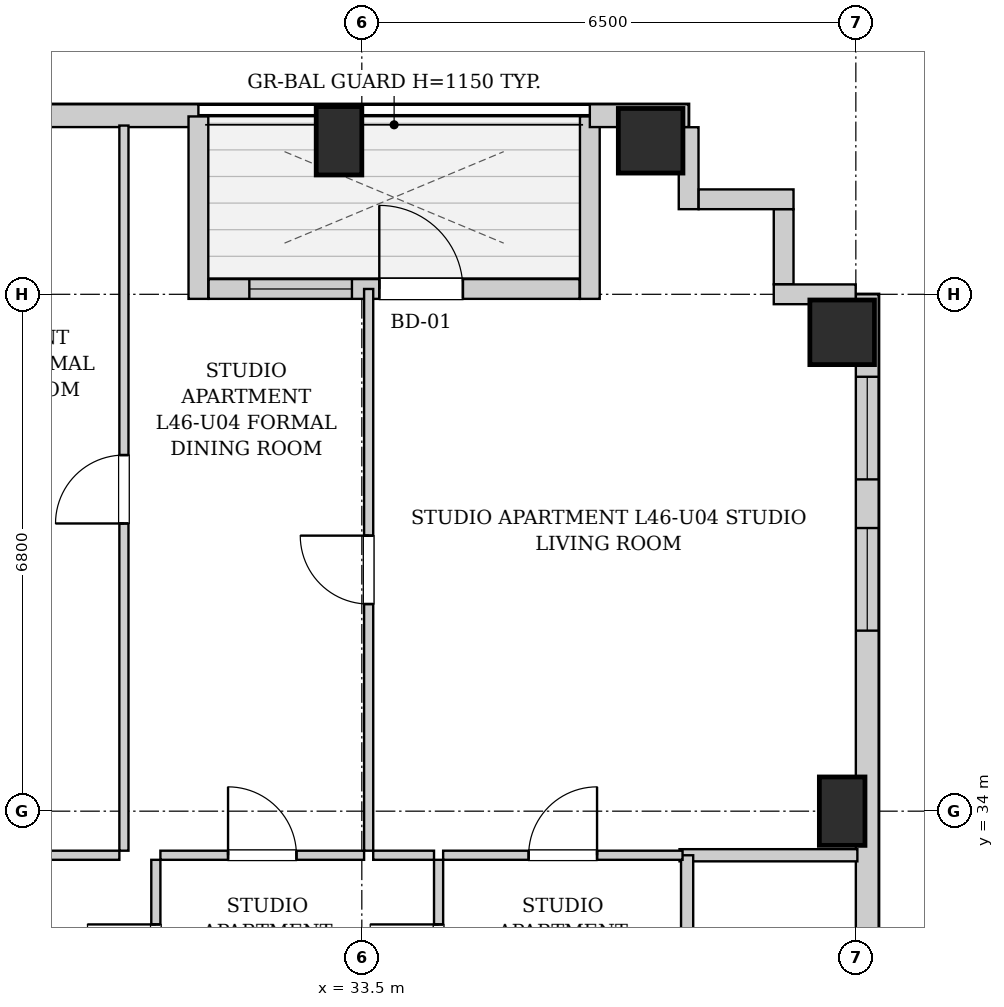
"""IFC4 building model, lengths in metres.
Left out: names, types, materials, properties, quantities, classifications, styles, units other than length and angle.
Written with IfcOpenShell. Run it as: python <this file> out.ifc"""

import sys

from ifc_helpers import new_model, si_unit, direction, frame, frame_2d, origin, origin_2d, place, context, subcontext, project, spatial, rectangle, extrude, element, fill, save


model = new_model("IFC4")
c1 = context("Model", 3, precision=1e-05, world=origin(), true_north=direction((0.0, 1.0)))
c2 = subcontext(c1, "Body", "Model", "MODEL_VIEW")
j1 = project(units=[si_unit("LENGTHUNIT", "METRE"), si_unit("PLANEANGLEUNIT", "RADIAN")], contexts=[c1])
p1 = place(None, origin())
s1 = spatial("IfcSite", under=j1, at=p1, CompositionType="ELEMENT")
p2 = place(p1, origin())
s2 = spatial("IfcBuilding", under=s1, at=p2, CompositionType="ELEMENT")
p3 = place(p2, frame((0.0, 0.0, 160.15)))
s3 = spatial("IfcBuildingStorey", under=s2, at=p3, CompositionType="ELEMENT", Elevation=160.15)
p4 = place(p3, frame((33.2, 42.82, 0.0), z_axis=(0.0, 0.0, 1.0), x_axis=(1.0, 0.0, 0.0)))
e1 = element("IfcColumn", 1, at=p4, inside=s3, PredefinedType="COLUMN", context=c2, shape_type="SweptSolid", body=[
    extrude(rectangle(XDim=0.6, YDim=0.9, at=origin_2d()), origin(), (0.0, 0.0, 1.0), 3.25),
])
p5 = place(p3, frame((37.3, 42.82, 0.0), z_axis=(0.0, 0.0, 1.0), x_axis=(1.0, 0.0, 0.0)))
e2 = element("IfcColumn", 2, at=p5, inside=s3, PredefinedType="COLUMN", context=c2, shape_type="SweptSolid", body=[
    extrude(rectangle(XDim=0.85, YDim=0.85, at=origin_2d()), origin(), (0.0, 0.0, 1.0), 3.25),
])
p6 = place(p3, frame((39.82, 34.0, 0.0), z_axis=(0.0, 0.0, 1.0), x_axis=(1.0, 0.0, 0.0)))
e3 = element("IfcColumn", 3, at=p6, inside=s3, PredefinedType="COLUMN", context=c2, shape_type="SweptSolid", body=[
    extrude(rectangle(XDim=0.6, YDim=0.9, at=origin_2d()), origin(), (0.0, 0.0, 1.0), 3.25),
])
p7 = place(p3, frame((39.82, 40.3, 0.0), z_axis=(0.0, 0.0, 1.0), x_axis=(1.0, 0.0, 0.0)))
e4 = element("IfcColumn", 4, at=p7, inside=s3, PredefinedType="COLUMN", context=c2, shape_type="SweptSolid", body=[
    extrude(rectangle(XDim=0.85, YDim=0.85, at=origin_2d()), origin(), (0.0, 0.0, 1.0), 3.25),
])
p8 = place(p3, frame((10.0, 43.15, 0.0), z_axis=(0.0, 0.0, 1.0), x_axis=(1.0, 0.0, 0.0)))
e5 = element("IfcWall", 5, at=p8, inside=s3, PredefinedType="SOLIDWALL", context=c2, shape_type="SweptSolid", body=[
    extrude(rectangle(XDim=21.35, YDim=0.3, at=frame_2d((10.675, 0.0))), origin(), (0.0, 0.0, 1.0), 2.99),
])
p9 = place(p8, frame((1.956, 0.0, 0.55)))
e6 = element("IfcOpeningElement", 6, at=p9, cuts=e5, PredefinedType="OPENING", context=c2, shape_type="SweptSolid", body=[
    extrude(rectangle(XDim=1.35, YDim=1.2, at=frame_2d((0.675, 0.6))), frame((0.0, 0.16, 0.0), z_axis=(0.0, -1.0, 0.0), x_axis=(1.0, 0.0, 0.0)), (0.0, 0.0, 1.0), 0.32),
])
p10 = place(p8, frame((5.189, 0.0, 0.55)))
e7 = element("IfcOpeningElement", 7, at=p10, cuts=e5, PredefinedType="OPENING", context=c2, shape_type="SweptSolid", body=[
    extrude(rectangle(XDim=1.35, YDim=1.2, at=frame_2d((0.675, 0.6))), frame((0.0, 0.16, 0.0), z_axis=(0.0, -1.0, 0.0), x_axis=(1.0, 0.0, 0.0)), (0.0, 0.0, 1.0), 0.32),
])
p11 = place(p8, frame((8.421, 0.0, 0.55)))
e8 = element("IfcOpeningElement", 8, at=p11, cuts=e5, PredefinedType="OPENING", context=c2, shape_type="SweptSolid", body=[
    extrude(rectangle(XDim=1.35, YDim=1.2, at=frame_2d((0.675, 0.6))), frame((0.0, 0.16, 0.0), z_axis=(0.0, -1.0, 0.0), x_axis=(1.0, 0.0, 0.0)), (0.0, 0.0, 1.0), 0.32),
])
p12 = place(p8, frame((11.15, 0.0, 0.55)))
e9 = element("IfcOpeningElement", 9, at=p12, cuts=e5, PredefinedType="OPENING", context=c2, shape_type="SweptSolid", body=[
    extrude(rectangle(XDim=1.35, YDim=1.2, at=frame_2d((0.675, 0.6))), frame((0.0, 0.16, 0.0), z_axis=(0.0, -1.0, 0.0), x_axis=(1.0, 0.0, 0.0)), (0.0, 0.0, 1.0), 0.32),
])
p13 = place(p8, frame((18.044, 0.0, 0.55)))
e10 = element("IfcOpeningElement", 10, at=p13, cuts=e5, PredefinedType="OPENING", context=c2, shape_type="SweptSolid", body=[
    extrude(rectangle(XDim=1.35, YDim=1.2, at=frame_2d((0.675, 0.6))), frame((0.0, 0.16, 0.0), z_axis=(0.0, -1.0, 0.0), x_axis=(1.0, 0.0, 0.0)), (0.0, 0.0, 1.0), 0.32),
])
p14 = place(p3, frame((31.35, 43.14, 0.0), z_axis=(0.0, 0.0, 1.0), x_axis=(0.0, -1.0, 0.0)))
e11 = element("IfcWall", 11, at=p14, inside=s3, PredefinedType="SOLIDWALL", context=c2, shape_type="SweptSolid", body=[
    extrude(rectangle(XDim=2.4, YDim=0.26, at=frame_2d((1.2, 0.0))), origin(), (0.0, 0.0, 1.0), 2.99),
])
p15 = place(p3, frame((31.484, 40.87, 0.0), z_axis=(0.0, 0.0, 1.0), x_axis=(1.0, 0.0, 0.0)))
e12 = element("IfcWall", 12, at=p15, inside=s3, PredefinedType="SOLIDWALL", context=c2, shape_type="SweptSolid", body=[
    extrude(rectangle(XDim=4.882, YDim=0.26, at=frame_2d((2.441, 0.0))), origin(), (0.0, 0.0, 1.0), 2.99),
])
p16 = place(p15, frame((2.246, 0.0, 0.0)))
e13 = element("IfcOpeningElement", 13, at=p16, cuts=e12, PredefinedType="OPENING", context=c2, shape_type="SweptSolid", body=[
    extrude(rectangle(XDim=1.1, YDim=2.0, at=frame_2d((0.55, 1.0))), frame((0.0, 0.14, 0.0), z_axis=(0.0, -1.0, 0.0), x_axis=(1.0, 0.0, 0.0)), (0.0, 0.0, 1.0), 0.28),
])
p17 = place(p15, frame((0.536, 0.0, 0.55)))
e14 = element("IfcOpeningElement", 14, at=p17, cuts=e12, PredefinedType="OPENING", context=c2, shape_type="SweptSolid", body=[
    extrude(rectangle(XDim=1.35, YDim=1.2, at=frame_2d((0.675, 0.6))), frame((0.0, 0.14, 0.0), z_axis=(0.0, -1.0, 0.0), x_axis=(1.0, 0.0, 0.0)), (0.0, 0.0, 1.0), 0.28),
])
p18 = place(p3, frame((36.5, 40.74, 0.0), z_axis=(0.0, 0.0, 1.0), x_axis=(0.0, 1.0, 0.0)))
e15 = element("IfcWall", 15, at=p18, inside=s3, PredefinedType="SOLIDWALL", context=c2, shape_type="SweptSolid", body=[
    extrude(rectangle(XDim=2.4, YDim=0.26, at=frame_2d((1.2, 0.0))), origin(), (0.0, 0.0, 1.0), 2.99),
])
p19 = place(p3, frame((36.5, 43.15, 0.0), z_axis=(0.0, 0.0, 1.0), x_axis=(1.0, 0.0, 0.0)))
e16 = element("IfcWall", 16, at=p19, inside=s3, PredefinedType="SOLIDWALL", context=c2, shape_type="SweptSolid", body=[
    extrude(rectangle(XDim=1.3, YDim=0.3, at=frame_2d((0.65, 0.0))), origin(), (0.0, 0.0, 1.0), 2.99),
])
p20 = place(p3, frame((40.15, 40.8, 0.0), z_axis=(0.0, 0.0, 1.0), x_axis=(0.0, -1.0, 0.0)))
e17 = element("IfcWall", 17, at=p20, inside=s3, PredefinedType="SOLIDWALL", context=c2, shape_type="SweptSolid", body=[
    extrude(rectangle(XDim=34.5, YDim=0.3, at=frame_2d((17.25, 0.0))), origin(), (0.0, 0.0, 1.0), 2.99),
])
p21 = place(p20, frame((31.575, 0.0, 0.55)))
e18 = element("IfcOpeningElement", 18, at=p21, cuts=e17, PredefinedType="OPENING", context=c2, shape_type="SweptSolid", body=[
    extrude(rectangle(XDim=1.35, YDim=1.2, at=frame_2d((0.675, 0.6))), frame((0.0, 0.16, 0.0), z_axis=(0.0, -1.0, 0.0), x_axis=(1.0, 0.0, 0.0)), (0.0, 0.0, 1.0), 0.32),
])
p22 = place(p20, frame((3.075, 0.0, 0.55)))
e19 = element("IfcOpeningElement", 19, at=p22, cuts=e17, PredefinedType="OPENING", context=c2, shape_type="SweptSolid", body=[
    extrude(rectangle(XDim=1.35, YDim=1.2, at=frame_2d((0.675, 0.6))), frame((0.0, 0.16, 0.0), z_axis=(0.0, -1.0, 0.0), x_axis=(1.0, 0.0, 0.0)), (0.0, 0.0, 1.0), 0.32),
])
p23 = place(p20, frame((1.085, 0.0, 0.55)))
e20 = element("IfcOpeningElement", 20, at=p23, cuts=e17, PredefinedType="OPENING", context=c2, shape_type="SweptSolid", body=[
    extrude(rectangle(XDim=1.35, YDim=1.2, at=frame_2d((0.675, 0.6))), frame((0.0, 0.16, 0.0), z_axis=(0.0, -1.0, 0.0), x_axis=(1.0, 0.0, 0.0)), (0.0, 0.0, 1.0), 0.32),
])
p24 = place(p20, frame((22.8, 0.0, 0.55)))
e21 = element("IfcOpeningElement", 21, at=p24, cuts=e17, PredefinedType="OPENING", context=c2, shape_type="SweptSolid", body=[
    extrude(rectangle(XDim=1.35, YDim=1.2, at=frame_2d((0.675, 0.6))), frame((0.0, 0.16, 0.0), z_axis=(0.0, -1.0, 0.0), x_axis=(1.0, 0.0, 0.0)), (0.0, 0.0, 1.0), 0.32),
])
p25 = place(p20, frame((13.425, 0.0, 0.55)))
e22 = element("IfcOpeningElement", 22, at=p25, cuts=e17, PredefinedType="OPENING", context=c2, shape_type="SweptSolid", body=[
    extrude(rectangle(XDim=1.35, YDim=1.2, at=frame_2d((0.675, 0.6))), frame((0.0, 0.16, 0.0), z_axis=(0.0, -1.0, 0.0), x_axis=(1.0, 0.0, 0.0)), (0.0, 0.0, 1.0), 0.32),
])
p26 = place(p3, frame((37.8, 42.998, 0.0), z_axis=(0.0, 0.0, 1.0), x_axis=(0.0, -1.0, 0.0)))
e23 = element("IfcWall", 23, at=p26, inside=s3, PredefinedType="SOLIDWALL", context=c2, shape_type="SweptSolid", body=[
    extrude(rectangle(XDim=1.078, YDim=0.26, at=frame_2d((0.539, 0.0))), origin(), (0.0, 0.0, 1.0), 2.99),
])
p27 = place(p3, frame((37.932, 42.05, 0.0), z_axis=(0.0, 0.0, 1.0), x_axis=(1.0, 0.0, 0.0)))
e24 = element("IfcWall", 24, at=p27, inside=s3, PredefinedType="SOLIDWALL", context=c2, shape_type="SweptSolid", body=[
    extrude(rectangle(XDim=1.248, YDim=0.26, at=frame_2d((0.624, 0.0))), origin(), (0.0, 0.0, 1.0), 2.99),
])
p28 = place(p3, frame((39.05, 41.918, 0.0), z_axis=(0.0, 0.0, 1.0), x_axis=(0.0, -1.0, 0.0)))
e25 = element("IfcWall", 25, at=p28, inside=s3, PredefinedType="SOLIDWALL", context=c2, shape_type="SweptSolid", body=[
    extrude(rectangle(XDim=0.986, YDim=0.26, at=frame_2d((0.493, 0.0))), origin(), (0.0, 0.0, 1.0), 2.99),
])
p29 = place(p3, frame((38.92, 40.8, 0.0), z_axis=(0.0, 0.0, 1.0), x_axis=(1.0, 0.0, 0.0)))
e26 = element("IfcWall", 26, at=p29, inside=s3, PredefinedType="SOLIDWALL", context=c2, shape_type="SweptSolid", body=[
    extrude(rectangle(XDim=1.078, YDim=0.26, at=frame_2d((0.539, 0.0))), origin(), (0.0, 0.0, 1.0), 2.99),
])
p30 = place(p3, frame((37.68, 33.42, 0.0), z_axis=(0.0, 0.0, 1.0), x_axis=(1.0, 0.0, 0.0)))
e27 = element("IfcWall", 27, at=p30, inside=s3, PredefinedType="PARTITIONING", context=c2, shape_type="SweptSolid", body=[
    extrude(rectangle(XDim=2.34, YDim=0.16, at=frame_2d((1.17, 0.0))), origin(), (0.0, 0.0, 1.0), 2.99),
])
p31 = place(p3, frame((37.78, 30.76, 0.0), z_axis=(0.0, 0.0, 1.0), x_axis=(0.0, 1.0, 0.0)))
e28 = element("IfcWall", 28, at=p31, inside=s3, PredefinedType="PARTITIONING", context=c2, shape_type="SweptSolid", body=[
    extrude(rectangle(XDim=2.66, YDim=0.16, at=frame_2d((1.33, 0.0))), origin(), (0.0, 0.0, 1.0), 2.99),
])
p32 = place(p3, frame((30.79, 30.76, 0.0), z_axis=(0.0, 0.0, 1.0), x_axis=(0.0, 1.0, 0.0)))
e29 = element("IfcWall", 29, at=p32, inside=s3, PredefinedType="PARTITIONING", context=c2, shape_type="SweptSolid", body=[
    extrude(rectangle(XDim=2.6, YDim=0.12, at=frame_2d((1.3, 0.0))), origin(), (0.0, 0.0, 1.0), 2.99),
])
p33 = place(p32, frame((0.85, 0.0, 0.0)))
e30 = element("IfcOpeningElement", 30, at=p33, cuts=e29, PredefinedType="OPENING", context=c2, shape_type="SweptSolid", body=[
    extrude(rectangle(XDim=0.9, YDim=2.05, at=frame_2d((0.45, 1.025))), frame((0.0, 0.07, 0.0), z_axis=(0.0, -1.0, 0.0), x_axis=(1.0, 0.0, 0.0)), (0.0, 0.0, 1.0), 0.14),
])
p34 = place(p3, frame((27.58, 33.42, 0.0), z_axis=(0.0, 0.0, 1.0), x_axis=(1.0, 0.0, 0.0)))
e31 = element("IfcWall", 31, at=p34, inside=s3, PredefinedType="PARTITIONING", context=c2, shape_type="SweptSolid", body=[
    extrude(rectangle(XDim=2.73, YDim=0.12, at=frame_2d((1.365, 0.0))), origin(), (0.0, 0.0, 1.0), 2.99),
])
p35 = place(p34, frame((0.915, 0.0, 0.0)))
e32 = element("IfcOpeningElement", 32, at=p35, cuts=e31, PredefinedType="OPENING", context=c2, shape_type="SweptSolid", body=[
    extrude(rectangle(XDim=0.9, YDim=2.05, at=frame_2d((0.45, 1.025))), frame((0.0, 0.07, 0.0), z_axis=(0.0, -1.0, 0.0), x_axis=(1.0, 0.0, 0.0)), (0.0, 0.0, 1.0), 0.14),
])
p36 = place(p3, frame((34.51, 30.76, 0.0), z_axis=(0.0, 0.0, 1.0), x_axis=(0.0, 1.0, 0.0)))
e33 = element("IfcWall", 33, at=p36, inside=s3, PredefinedType="PARTITIONING", context=c2, shape_type="SweptSolid", body=[
    extrude(rectangle(XDim=2.6, YDim=0.12, at=frame_2d((1.3, 0.0))), origin(), (0.0, 0.0, 1.0), 2.99),
])
p37 = place(p36, frame((0.85, 0.0, 0.0)))
e34 = element("IfcOpeningElement", 34, at=p37, cuts=e33, PredefinedType="OPENING", context=c2, shape_type="SweptSolid", body=[
    extrude(rectangle(XDim=0.9, YDim=2.05, at=frame_2d((0.45, 1.025))), frame((0.0, 0.07, 0.0), z_axis=(0.0, -1.0, 0.0), x_axis=(1.0, 0.0, 0.0)), (0.0, 0.0, 1.0), 0.14),
])
p38 = place(p3, frame((30.85, 33.42, 0.0), z_axis=(0.0, 0.0, 1.0), x_axis=(1.0, 0.0, 0.0)))
e35 = element("IfcWall", 35, at=p38, inside=s3, PredefinedType="PARTITIONING", context=c2, shape_type="SweptSolid", body=[
    extrude(rectangle(XDim=2.68, YDim=0.12, at=frame_2d((1.34, 0.0))), origin(), (0.0, 0.0, 1.0), 2.99),
])
p39 = place(p38, frame((0.89, 0.0, 0.0)))
e36 = element("IfcOpeningElement", 36, at=p39, cuts=e35, PredefinedType="OPENING", context=c2, shape_type="SweptSolid", body=[
    extrude(rectangle(XDim=0.9, YDim=2.05, at=frame_2d((0.45, 1.025))), frame((0.0, 0.07, 0.0), z_axis=(0.0, -1.0, 0.0), x_axis=(1.0, 0.0, 0.0)), (0.0, 0.0, 1.0), 0.14),
])
p40 = place(p3, frame((33.65, 33.42, 0.0), z_axis=(0.0, 0.0, 1.0), x_axis=(1.0, 0.0, 0.0)))
e37 = element("IfcWall", 37, at=p40, inside=s3, PredefinedType="PARTITIONING", context=c2, shape_type="SweptSolid", body=[
    extrude(rectangle(XDim=0.8, YDim=0.12, at=frame_2d((0.4, 0.0))), origin(), (0.0, 0.0, 1.0), 2.99),
])
p41 = place(p3, frame((34.57, 33.42, 0.0), z_axis=(0.0, 0.0, 1.0), x_axis=(1.0, 0.0, 0.0)))
e38 = element("IfcWall", 38, at=p41, inside=s3, PredefinedType="PARTITIONING", context=c2, shape_type="SweptSolid", body=[
    extrude(rectangle(XDim=3.15, YDim=0.12, at=frame_2d((1.575, 0.0))), origin(), (0.0, 0.0, 1.0), 2.99),
])
p42 = place(p41, frame((1.125, 0.0, 0.0)))
e39 = element("IfcOpeningElement", 39, at=p42, cuts=e38, PredefinedType="OPENING", context=c2, shape_type="SweptSolid", body=[
    extrude(rectangle(XDim=0.9, YDim=2.05, at=frame_2d((0.45, 1.025))), frame((0.0, 0.07, 0.0), z_axis=(0.0, -1.0, 0.0), x_axis=(1.0, 0.0, 0.0)), (0.0, 0.0, 1.0), 0.14),
])
p43 = place(p3, frame((30.37, 33.48, 0.0), z_axis=(0.0, 0.0, 1.0), x_axis=(0.0, 1.0, 0.0)))
e40 = element("IfcWall", 40, at=p43, inside=s3, PredefinedType="PARTITIONING", context=c2, shape_type="SweptSolid", body=[
    extrude(rectangle(XDim=9.54, YDim=0.12, at=frame_2d((4.77, 0.0))), origin(), (0.0, 0.0, 1.0), 2.99),
])
p44 = place(p43, frame((4.305, 0.0, 0.0)))
e41 = element("IfcOpeningElement", 41, at=p44, cuts=e40, PredefinedType="OPENING", context=c2, shape_type="SweptSolid", body=[
    extrude(rectangle(XDim=0.9, YDim=2.05, at=frame_2d((0.45, 1.025))), frame((0.0, 0.07, 0.0), z_axis=(0.0, -1.0, 0.0), x_axis=(1.0, 0.0, 0.0)), (0.0, 0.0, 1.0), 0.14),
])
p45 = place(p3, frame((33.59, 33.48, 0.0), z_axis=(0.0, 0.0, 1.0), x_axis=(0.0, 1.0, 0.0)))
e42 = element("IfcWall", 42, at=p45, inside=s3, PredefinedType="PARTITIONING", context=c2, shape_type="SweptSolid", body=[
    extrude(rectangle(XDim=7.39, YDim=0.12, at=frame_2d((3.695, 0.0))), origin(), (0.0, 0.0, 1.0), 2.99),
])
p46 = place(p45, frame((3.245, 0.0, 0.0)))
e43 = element("IfcOpeningElement", 43, at=p46, cuts=e42, PredefinedType="OPENING", context=c2, shape_type="SweptSolid", body=[
    extrude(rectangle(XDim=0.9, YDim=2.05, at=frame_2d((0.45, 1.025))), frame((0.0, 0.07, 0.0), z_axis=(0.0, -1.0, 0.0), x_axis=(1.0, 0.0, 0.0)), (0.0, 0.0, 1.0), 0.14),
])
p47 = place(p33, origin())
e44 = element("IfcDoor", 44, at=p47, inside=s3, OperationType="SINGLE_SWING_RIGHT", PredefinedType="DOOR", context=c2, shape_type="SweptSolid", body=[
    extrude(rectangle(XDim=0.9, YDim=2.05, at=frame_2d((0.45, 1.025))), frame((0.0, 0.025, 0.0), z_axis=(0.0, -1.0, 0.0), x_axis=(1.0, 0.0, 0.0)), (0.0, 0.0, 1.0), 0.05),
])
fill(e30, e44)
p48 = place(p37, origin())
e45 = element("IfcDoor", 45, at=p48, inside=s3, OperationType="SINGLE_SWING_RIGHT", PredefinedType="DOOR", context=c2, shape_type="SweptSolid", body=[
    extrude(rectangle(XDim=0.9, YDim=2.05, at=frame_2d((0.45, 1.025))), frame((0.0, 0.025, 0.0), z_axis=(0.0, -1.0, 0.0), x_axis=(1.0, 0.0, 0.0)), (0.0, 0.0, 1.0), 0.05),
])
fill(e34, e45)
p49 = place(p39, origin())
e46 = element("IfcDoor", 46, at=p49, inside=s3, OperationType="SINGLE_SWING_LEFT", PredefinedType="DOOR", context=c2, shape_type="SweptSolid", body=[
    extrude(rectangle(XDim=0.9, YDim=2.05, at=frame_2d((0.45, 1.025))), frame((0.0, 0.025, 0.0), z_axis=(0.0, -1.0, 0.0), x_axis=(1.0, 0.0, 0.0)), (0.0, 0.0, 1.0), 0.05),
])
fill(e36, e46)
p50 = place(p42, origin())
e47 = element("IfcDoor", 47, at=p50, inside=s3, OperationType="SINGLE_SWING_RIGHT", PredefinedType="DOOR", context=c2, shape_type="SweptSolid", body=[
    extrude(rectangle(XDim=0.9, YDim=2.05, at=frame_2d((0.45, 1.025))), frame((0.0, 0.025, 0.0), z_axis=(0.0, -1.0, 0.0), x_axis=(1.0, 0.0, 0.0)), (0.0, 0.0, 1.0), 0.05),
])
fill(e39, e47)
p51 = place(p44, origin())
e48 = element("IfcDoor", 48, at=p51, inside=s3, OperationType="SINGLE_SWING_LEFT", PredefinedType="DOOR", context=c2, shape_type="SweptSolid", body=[
    extrude(rectangle(XDim=0.9, YDim=2.05, at=frame_2d((0.45, 1.025))), frame((0.0, 0.025, 0.0), z_axis=(0.0, -1.0, 0.0), x_axis=(1.0, 0.0, 0.0)), (0.0, 0.0, 1.0), 0.05),
])
fill(e41, e48)
p52 = place(p46, origin())
e49 = element("IfcDoor", 49, at=p52, inside=s3, OperationType="SINGLE_SWING_RIGHT", PredefinedType="DOOR", context=c2, shape_type="SweptSolid", body=[
    extrude(rectangle(XDim=0.9, YDim=2.05, at=frame_2d((0.45, 1.025))), frame((0.0, 0.025, 0.0), z_axis=(0.0, -1.0, 0.0), x_axis=(1.0, 0.0, 0.0)), (0.0, 0.0, 1.0), 0.05),
])
fill(e43, e49)
p53 = place(p16, origin())
e50 = element("IfcDoor", 50, at=p53, inside=s3, OperationType="SINGLE_SWING_LEFT", PredefinedType="DOOR", context=c2, shape_type="SweptSolid", body=[
    extrude(rectangle(XDim=1.1, YDim=2.0, at=frame_2d((0.55, 1.0))), frame((0.0, 0.025, 0.0), z_axis=(0.0, -1.0, 0.0), x_axis=(1.0, 0.0, 0.0)), (0.0, 0.0, 1.0), 0.05),
])
fill(e13, e50)
p54 = place(p17, origin())
e51 = element("IfcWindow", 51, at=p54, inside=s3, PartitioningType="SINGLE_PANEL", PredefinedType="WINDOW", context=c2, shape_type="SweptSolid", body=[
    extrude(rectangle(XDim=1.35, YDim=1.2, at=frame_2d((0.675, 0.6))), frame((0.0, 0.03, 0.0), z_axis=(0.0, -1.0, 0.0), x_axis=(1.0, 0.0, 0.0)), (0.0, 0.0, 1.0), 0.06),
])
fill(e14, e51)
p55 = place(p22, origin())
e52 = element("IfcWindow", 52, at=p55, inside=s3, PartitioningType="SINGLE_PANEL", PredefinedType="WINDOW", context=c2, shape_type="SweptSolid", body=[
    extrude(rectangle(XDim=1.35, YDim=1.2, at=frame_2d((0.675, 0.6))), frame((0.0, 0.03, 0.0), z_axis=(0.0, -1.0, 0.0), x_axis=(1.0, 0.0, 0.0)), (0.0, 0.0, 1.0), 0.06),
])
fill(e19, e52)
p56 = place(p23, origin())
e53 = element("IfcWindow", 53, at=p56, inside=s3, PartitioningType="SINGLE_PANEL", PredefinedType="WINDOW", context=c2, shape_type="SweptSolid", body=[
    extrude(rectangle(XDim=1.35, YDim=1.2, at=frame_2d((0.675, 0.6))), frame((0.0, 0.03, 0.0), z_axis=(0.0, -1.0, 0.0), x_axis=(1.0, 0.0, 0.0)), (0.0, 0.0, 1.0), 0.06),
])
fill(e20, e53)
save(model, sys.argv[1])
